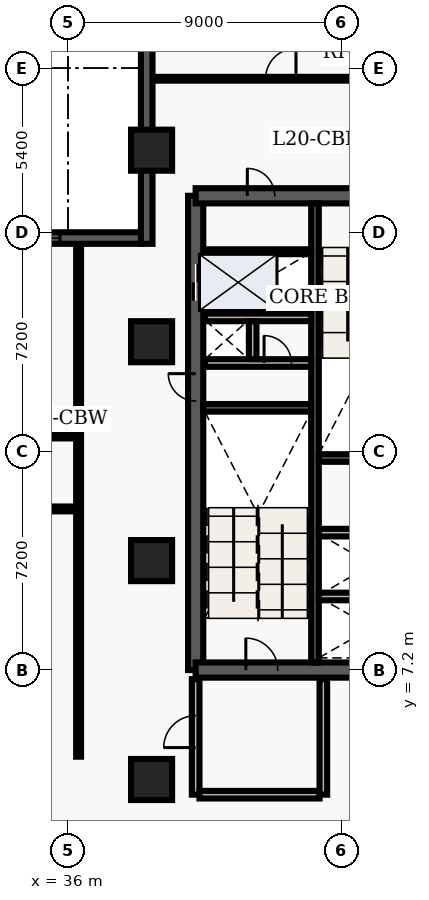
"""IFC4 building model, lengths in metres.
Left out: names, types, materials, properties, quantities, classifications, styles, units other than length and angle.
Written with IfcOpenShell. Run it as: python <this file> out.ifc"""

import sys

from ifc_helpers import new_model, entity, si_unit, converted_unit, direction, frame, origin_with_axes, origin_2d_with_axis, place, context, subcontext, project, spatial, polyline, rectangle, outline, extrude, element, fill, save


model = new_model("IFC4")
c1 = context("Model", 3, precision=1e-05, world=origin_with_axes(), true_north=direction((0.0, 1.0)))
c2 = subcontext(c1, "Body", "Model", "MODEL_VIEW")
j1 = project(units=[si_unit("LENGTHUNIT", "METRE"), converted_unit("PLANEANGLEUNIT", "DEGREE", entity("IfcPlaneAngleMeasure", 0.017), si_unit("PLANEANGLEUNIT", "RADIAN"), dimensions=[0, 0, 0, 0, 0, 0, 0])], contexts=[c1])
p1 = place(None, origin_with_axes())
s1 = spatial("IfcSite", under=j1, at=p1, CompositionType="ELEMENT")
p2 = place(p1, origin_with_axes())
s2 = spatial("IfcBuilding", under=s1, at=p2, CompositionType="ELEMENT")
p3 = place(p2, frame((0.0, 0.0, 84.6), z_axis=(0.0, 0.0, 1.0), x_axis=(1.0, 0.0, 0.0)))
s3 = spatial("IfcBuildingStorey", under=s2, at=p3, CompositionType="ELEMENT", Elevation=84.6)
p4 = place(p3, frame((40.2, 7.2, 0.0), z_axis=(0.0, 0.0, 1.0), x_axis=(0.0, 1.0, 0.0)))
e1 = element("IfcWall", 1, at=p4, inside=s3, PredefinedType="SHEAR", context=c2, shape_type="SweptSolid", body=[
    extrude(outline(polyline([(0.0, -0.25), (15.6, -0.25), (15.6, 0.25), (0.0, 0.25), (0.0, -0.25)])), origin_with_axes(), (0.0, 0.0, 1.0), 4.26),
])
p5 = place(p4, frame((12.75, 0.0, 0.0), z_axis=(0.0, 0.0, 1.0), x_axis=(1.0, 0.0, 0.0)))
e2 = element("IfcOpeningElement", 2, at=p5, cuts=e1, PredefinedType="OPENING", context=c2, shape_type="SweptSolid", body=[
    extrude(rectangle(XDim=1.2, YDim=0.52, at=origin_2d_with_axis()), origin_with_axes(), (0.0, 0.0, 1.0), 2.15),
])
p6 = place(p4, frame((9.3, 0.0, 0.0), z_axis=(0.0, 0.0, 1.0), x_axis=(1.0, 0.0, 0.0)))
e3 = element("IfcOpeningElement", 3, at=p6, cuts=e1, PredefinedType="OPENING", context=c2, shape_type="SweptSolid", body=[
    extrude(rectangle(XDim=0.9, YDim=0.52, at=origin_2d_with_axis()), origin_with_axes(), (0.0, 0.0, 1.0), 2.15),
])
p7 = place(p3, frame((40.2, 7.2, 0.0), z_axis=(0.0, 0.0, 1.0), x_axis=(1.0, 0.0, 0.0)))
e4 = element("IfcWall", 4, at=p7, inside=s3, PredefinedType="SHEAR", context=c2, shape_type="SweptSolid", body=[
    extrude(outline(polyline([(0.0, -0.25), (7.85, -0.25), (7.85, 0.25), (0.0, 0.25), (0.0, -0.25)])), origin_with_axes(), (0.0, 0.0, 1.0), 4.26),
])
p8 = place(p7, frame((2.175, 0.0, 0.0), z_axis=(0.0, 0.0, 1.0), x_axis=(1.0, 0.0, 0.0)))
e5 = element("IfcOpeningElement", 5, at=p8, cuts=e4, PredefinedType="OPENING", context=c2, shape_type="SweptSolid", body=[
    extrude(rectangle(XDim=1.05, YDim=0.52, at=origin_2d_with_axis()), origin_with_axes(), (0.0, 0.0, 1.0), 2.15),
])
p9 = place(p3, frame((40.2, 22.8, 0.0), z_axis=(0.0, 0.0, 1.0), x_axis=(1.0, 0.0, 0.0)))
e6 = element("IfcWall", 6, at=p9, inside=s3, PredefinedType="SHEAR", context=c2, shape_type="SweptSolid", body=[
    extrude(outline(polyline([(0.0, -0.25), (7.85, -0.25), (7.85, 0.25), (0.0, 0.25), (0.0, -0.25)])), origin_with_axes(), (0.0, 0.0, 1.0), 4.26),
])
p10 = place(p9, frame((5.775, 0.0, 0.0), z_axis=(0.0, 0.0, 1.0), x_axis=(1.0, 0.0, 0.0)))
e7 = element("IfcOpeningElement", 7, at=p10, cuts=e6, PredefinedType="OPENING", context=c2, shape_type="SweptSolid", body=[
    extrude(rectangle(XDim=1.05, YDim=0.52, at=origin_2d_with_axis()), origin_with_axes(), (0.0, 0.0, 1.0), 2.15),
])
p11 = place(p9, frame((2.15, 0.0, 0.0), z_axis=(0.0, 0.0, 1.0), x_axis=(1.0, 0.0, 0.0)))
e8 = element("IfcOpeningElement", 8, at=p11, cuts=e6, PredefinedType="OPENING", context=c2, shape_type="SweptSolid", body=[
    extrude(rectangle(XDim=0.9, YDim=0.52, at=origin_2d_with_axis()), origin_with_axes(), (0.0, 0.0, 1.0), 2.15),
])
p12 = place(p3, frame((44.125, 7.45, 0.0), z_axis=(0.0, 0.0, 1.0), x_axis=(0.0, 1.0, 0.0)))
e9 = element("IfcWall", 9, at=p12, inside=s3, PredefinedType="SHEAR", context=c2, shape_type="SweptSolid", body=[
    extrude(outline(polyline([(0.0, -0.125), (15.1, -0.125), (15.1, 0.125), (0.0, 0.125), (0.0, -0.125)])), origin_with_axes(), (0.0, 0.0, 1.0), 4.26),
])
for number, where, z_axis, x_axis in (
    (10, (40.45, 15.825, 0.0), (0.0, 0.0, 1.0), (1.0, 0.0, 0.0)),
    (11, (44.25, 14.175, 0.0), (0.0, 0.0, 1.0), (1.0, 0.0, 0.0)),
):
    element("IfcWall", number, at=place(p3, frame(where, z_axis=z_axis, x_axis=x_axis)), inside=s3, PredefinedType="SHEAR", context=c2, shape_type="SweptSolid", body=[
        extrude(outline(polyline([(0.0, -0.125), (3.55, -0.125), (3.55, 0.125), (0.0, 0.125), (0.0, -0.125)])), origin_with_axes(), (0.0, 0.0, 1.0), 4.26),
    ])
p13 = place(p3, frame((40.5, 17.3, 0.0), z_axis=(0.0, 0.0, 1.0), x_axis=(1.0, 0.0, 0.0)))
e12 = element("IfcWall", 12, at=p13, inside=s3, PredefinedType="SOLIDWALL", context=c2, shape_type="SweptSolid", body=[
    extrude(outline(polyline([(0.0, -0.125), (3.5, -0.125), (3.5, 0.125), (0.0, 0.125), (0.0, -0.125)])), origin_with_axes(), (0.0, 0.0, 1.0), 3.3),
])
p14 = place(p13, frame((2.4, 0.0, 0.0), z_axis=(0.0, 0.0, 1.0), x_axis=(1.0, 0.0, 0.0)))
e13 = element("IfcOpeningElement", 13, at=p14, cuts=e12, PredefinedType="OPENING", context=c2, shape_type="SweptSolid", body=[
    extrude(rectangle(XDim=0.9, YDim=0.27, at=origin_2d_with_axis()), origin_with_axes(), (0.0, 0.0, 1.0), 2.15),
])
p15 = place(p3, frame((40.5, 18.8, 0.0), z_axis=(0.0, 0.0, 1.0), x_axis=(1.0, 0.0, 0.0)))
e14 = element("IfcWall", 14, at=p15, inside=s3, PredefinedType="SOLIDWALL", context=c2, shape_type="SweptSolid", body=[
    extrude(outline(polyline([(0.0, -0.125), (3.5, -0.125), (3.5, 0.125), (0.0, 0.125), (0.0, -0.125)])), origin_with_axes(), (0.0, 0.0, 1.0), 3.3),
])
p16 = place(p3, frame((42.075, 17.43, 0.0), z_axis=(0.0, 0.0, 1.0), x_axis=(0.0, 1.0, 0.0)))
e15 = element("IfcWall", 15, at=p16, inside=s3, PredefinedType="SOLIDWALL", context=c2, shape_type="SweptSolid", body=[
    extrude(outline(polyline([(0.0, -0.125), (1.24, -0.125), (1.24, 0.125), (0.0, 0.125), (0.0, -0.125)])), origin_with_axes(), (0.0, 0.0, 1.0), 3.3),
])
p17 = place(p3, frame((40.2, 3.1, 0.0), z_axis=(0.0, 0.0, 1.0), x_axis=(0.0, 1.0, 0.0)))
e16 = element("IfcWall", 16, at=p17, inside=s3, PredefinedType="SOLIDWALL", context=c2, shape_type="SweptSolid", body=[
    extrude(outline(polyline([(0.0, -0.125), (3.8, -0.125), (3.8, 0.125), (0.0, 0.125), (0.0, -0.125)])), origin_with_axes(), (0.0, 0.0, 1.0), 3.3),
])
p18 = place(p17, frame((2.075, 0.0, 0.0), z_axis=(0.0, 0.0, 1.0), x_axis=(1.0, 0.0, 0.0)))
e17 = element("IfcOpeningElement", 17, at=p18, cuts=e16, PredefinedType="OPENING", context=c2, shape_type="SweptSolid", body=[
    extrude(rectangle(XDim=1.05, YDim=0.27, at=origin_2d_with_axis()), origin_with_axes(), (0.0, 0.0, 1.0), 2.15),
])
p19 = place(p3, frame((40.325, 3.1, 0.0), z_axis=(0.0, 0.0, 1.0), x_axis=(1.0, 0.0, 0.0)))
e18 = element("IfcWall", 18, at=p19, inside=s3, PredefinedType="SOLIDWALL", context=c2, shape_type="SweptSolid", body=[
    extrude(outline(polyline([(0.0, -0.125), (3.95, -0.125), (3.95, 0.125), (0.0, 0.125), (0.0, -0.125)])), origin_with_axes(), (0.0, 0.0, 1.0), 3.3),
])
p20 = place(p3, frame((44.4, 3.1, 0.0), z_axis=(0.0, 0.0, 1.0), x_axis=(0.0, 1.0, 0.0)))
e19 = element("IfcWall", 19, at=p20, inside=s3, PredefinedType="SOLIDWALL", context=c2, shape_type="SweptSolid", body=[
    extrude(outline(polyline([(0.0, -0.125), (3.8, -0.125), (3.8, 0.125), (0.0, 0.125), (0.0, -0.125)])), origin_with_axes(), (0.0, 0.0, 1.0), 3.3),
])
for number, where, z_axis, x_axis in (
    (20, (38.75, 3.6, 0.0), (0.0, 0.0, 1.0), (1.0, 0.0, 0.0)),
    (21, (38.75, 10.8, 0.0), (0.0, 0.0, 1.0), (1.0, 0.0, 0.0)),
    (22, (38.75, 18.0, 0.0), (0.0, 0.0, 1.0), (1.0, 0.0, 0.0)),
    (23, (38.75, 24.3, 0.0), (0.0, 0.0, 1.0), (1.0, 0.0, 0.0)),
):
    element("IfcColumn", number, at=place(p3, frame(where, z_axis=z_axis, x_axis=x_axis)), inside=s3, PredefinedType="COLUMN", context=c2, shape_type="SweptSolid", body=[
        extrude(rectangle(XDim=1.35, YDim=1.35, at=origin_2d_with_axis()), origin_with_axes(), (0.0, 0.0, 1.0), 4.5),
    ])
p21 = place(p3, frame((40.5, 20.96, 0.0), z_axis=(0.0, 0.0, 1.0), x_axis=(1.0, 0.0, 0.0)))
e24 = element("IfcWall", 24, at=p21, inside=s3, PredefinedType="PARTITIONING", context=c2, shape_type="SweptSolid", body=[
    extrude(outline(polyline([(0.0, -0.08), (3.5, -0.08), (3.5, 0.08), (0.0, 0.08), (0.0, -0.08)])), origin_with_axes(), (0.0, 0.0, 1.0), 3.2),
])
for number, where, z_axis, x_axis in (
    (25, (44.25, 9.62, 0.0), (0.0, 0.0, 1.0), (1.0, 0.0, 0.0)),
    (26, (44.25, 11.72, 0.0), (0.0, 0.0, 1.0), (1.0, 0.0, 0.0)),
):
    element("IfcWall", number, at=place(p3, frame(where, z_axis=z_axis, x_axis=x_axis)), inside=s3, PredefinedType="SOLIDWALL", context=c2, shape_type="SweptSolid", body=[
        extrude(outline(polyline([(0.0, -0.125), (3.5, -0.125), (3.5, 0.125), (0.0, 0.125), (0.0, -0.125)])), origin_with_axes(), (0.0, 0.0, 1.0), 3.2),
    ])
p22 = place(p3, frame((21.15, 12.5, 0.0), z_axis=(0.0, 0.0, 1.0), x_axis=(1.0, 0.0, 0.0)))
e27 = element("IfcWall", 27, at=p22, inside=s3, PredefinedType="PARTITIONING", context=c2, shape_type="SweptSolid", body=[
    extrude(outline(polyline([(0.0, -0.08), (15.2, -0.08), (15.2, 0.08), (0.0, 0.08), (0.0, -0.08)])), origin_with_axes(), (0.0, 0.0, 1.0), 3.2),
])
p23 = place(p22, frame((3.491, 0.0, 0.0), z_axis=(0.0, 0.0, 1.0), x_axis=(1.0, 0.0, 0.0)))
e28 = element("IfcOpeningElement", 28, at=p23, cuts=e27, PredefinedType="OPENING", context=c2, shape_type="SweptSolid", body=[
    extrude(rectangle(XDim=1.0, YDim=0.18, at=origin_2d_with_axis()), origin_with_axes(), (0.0, 0.0, 1.0), 2.15),
])
p24 = place(p22, frame((10.961, 0.0, 0.0), z_axis=(0.0, 0.0, 1.0), x_axis=(1.0, 0.0, 0.0)))
e29 = element("IfcOpeningElement", 29, at=p24, cuts=e27, PredefinedType="OPENING", context=c2, shape_type="SweptSolid", body=[
    extrude(rectangle(XDim=1.0, YDim=0.18, at=origin_2d_with_axis()), origin_with_axes(), (0.0, 0.0, 1.0), 2.15),
])
p25 = place(p3, frame((21.15, 14.9, 0.0), z_axis=(0.0, 0.0, 1.0), x_axis=(1.0, 0.0, 0.0)))
e30 = element("IfcWall", 30, at=p25, inside=s3, PredefinedType="PARTITIONING", context=c2, shape_type="SweptSolid", body=[
    extrude(outline(polyline([(0.0, -0.08), (15.2, -0.08), (15.2, 0.08), (0.0, 0.08), (0.0, -0.08)])), origin_with_axes(), (0.0, 0.0, 1.0), 3.2),
])
p26 = place(p25, frame((3.515, 0.0, 0.0), z_axis=(0.0, 0.0, 1.0), x_axis=(1.0, 0.0, 0.0)))
e31 = element("IfcOpeningElement", 31, at=p26, cuts=e30, PredefinedType="OPENING", context=c2, shape_type="SweptSolid", body=[
    extrude(rectangle(XDim=1.0, YDim=0.18, at=origin_2d_with_axis()), origin_with_axes(), (0.0, 0.0, 1.0), 2.15),
])
p27 = place(p25, frame((10.986, 0.0, 0.0), z_axis=(0.0, 0.0, 1.0), x_axis=(1.0, 0.0, 0.0)))
e32 = element("IfcOpeningElement", 32, at=p27, cuts=e30, PredefinedType="OPENING", context=c2, shape_type="SweptSolid", body=[
    extrude(rectangle(XDim=1.0, YDim=0.18, at=origin_2d_with_axis()), origin_with_axes(), (0.0, 0.0, 1.0), 2.15),
])
p28 = place(p3, frame((36.35, 4.35, 0.0), z_axis=(0.0, 0.0, 1.0), x_axis=(0.0, 1.0, 0.0)))
e33 = element("IfcWall", 33, at=p28, inside=s3, PredefinedType="PARTITIONING", context=c2, shape_type="SweptSolid", body=[
    extrude(outline(polyline([(0.0, -0.08), (16.95, -0.08), (16.95, 0.08), (0.0, 0.08), (0.0, -0.08)])), origin_with_axes(), (0.0, 0.0, 1.0), 3.2),
])
p29 = place(p3, frame((38.76, 26.65, 0.0), z_axis=(0.0, 0.0, 1.0), x_axis=(1.0, 0.0, 0.0)))
e34 = element("IfcWall", 34, at=p29, inside=s3, PredefinedType="PARTITIONING", context=c2, shape_type="SweptSolid", body=[
    extrude(outline(polyline([(0.0, -0.062), (20.88, -0.062), (20.88, 0.062), (0.0, 0.062), (0.0, -0.062)])), origin_with_axes(), (0.0, 0.0, 1.0), 3.2),
])
p30 = place(p29, frame((4.24, 0.0, 0.0), z_axis=(0.0, 0.0, 1.0), x_axis=(1.0, 0.0, 0.0)))
e35 = element("IfcOpeningElement", 35, at=p30, cuts=e34, PredefinedType="OPENING", context=c2, shape_type="SweptSolid", body=[
    extrude(rectangle(XDim=1.0, YDim=0.145, at=origin_2d_with_axis()), origin_with_axes(), (0.0, 0.0, 1.0), 2.15),
])
p31 = place(p3, frame((38.59, 21.22, 0.0), z_axis=(0.0, 0.0, 1.0), x_axis=(0.0, 1.0, 0.0)))
e36 = element("IfcWall", 36, at=p31, inside=s3, PredefinedType="SOLIDWALL", context=c2, shape_type="SweptSolid", body=[
    extrude(outline(polyline([(0.0, -0.19), (7.58, -0.19), (7.58, 0.19), (0.0, 0.19), (0.0, -0.19)])), origin_with_axes(), (0.0, 0.0, 1.0), 4.26),
])
p32 = place(p3, frame((21.22, 21.41, 0.0), z_axis=(0.0, 0.0, 1.0), x_axis=(1.0, 0.0, 0.0)))
e37 = element("IfcWall", 37, at=p32, inside=s3, PredefinedType="SOLIDWALL", context=c2, shape_type="SweptSolid", body=[
    extrude(outline(polyline([(0.0, -0.19), (17.18, -0.19), (17.18, 0.19), (0.0, 0.19), (0.0, -0.19)])), origin_with_axes(), (0.0, 0.0, 1.0), 4.26),
])
p33 = place(p32, frame((3.263, 0.0, 0.45), z_axis=(0.0, 0.0, 1.0), x_axis=(1.0, 0.0, 0.0)))
e38 = element("IfcOpeningElement", 38, at=p33, cuts=e37, PredefinedType="OPENING", context=c2, shape_type="SweptSolid", body=[
    extrude(rectangle(XDim=2.1, YDim=0.4, at=origin_2d_with_axis()), origin_with_axes(), (0.0, 0.0, 1.0), 2.2),
])
p34 = place(p32, frame((8.59, 0.0, 0.45), z_axis=(0.0, 0.0, 1.0), x_axis=(1.0, 0.0, 0.0)))
e39 = element("IfcOpeningElement", 39, at=p34, cuts=e37, PredefinedType="OPENING", context=c2, shape_type="SweptSolid", body=[
    extrude(rectangle(XDim=2.1, YDim=0.4, at=origin_2d_with_axis()), origin_with_axes(), (0.0, 0.0, 1.0), 2.2),
])
p35 = place(p32, frame((13.467, 0.0, 0.45), z_axis=(0.0, 0.0, 1.0), x_axis=(1.0, 0.0, 0.0)))
e40 = element("IfcOpeningElement", 40, at=p35, cuts=e37, PredefinedType="OPENING", context=c2, shape_type="SweptSolid", body=[
    extrude(rectangle(XDim=2.1, YDim=0.4, at=origin_2d_with_axis()), origin_with_axes(), (0.0, 0.0, 1.0), 2.2),
])
p36 = place(p4, frame((12.75, 0.0, 0.0), z_axis=(0.0, 0.0, 1.0), x_axis=(1.0, 0.0, 0.0)))
e41 = element("IfcDoor", 41, at=p36, inside=s3, OperationType="DOUBLE_DOOR_SLIDING", PredefinedType="DOOR", context=c2, shape_type="SweptSolid", body=[
    extrude(rectangle(XDim=1.2, YDim=0.09, at=origin_2d_with_axis()), origin_with_axes(), (0.0, 0.0, 1.0), 2.15),
])
fill(e2, e41)
p37 = place(p4, frame((9.3, 0.0, 0.0), z_axis=(0.0, 0.0, 1.0), x_axis=(1.0, 0.0, 0.0)))
e42 = element("IfcDoor", 42, at=p37, inside=s3, OperationType="SINGLE_SWING_RIGHT", PredefinedType="DOOR", context=c2, shape_type="SweptSolid", body=[
    extrude(rectangle(XDim=0.9, YDim=0.09, at=origin_2d_with_axis()), origin_with_axes(), (0.0, 0.0, 1.0), 2.15),
])
fill(e3, e42)
p38 = place(p13, frame((2.4, 0.0, 0.0), z_axis=(0.0, 0.0, 1.0), x_axis=(1.0, 0.0, 0.0)))
e43 = element("IfcDoor", 43, at=p38, inside=s3, OperationType="SINGLE_SWING_LEFT", PredefinedType="DOOR", context=c2, shape_type="SweptSolid", body=[
    extrude(rectangle(XDim=0.9, YDim=0.09, at=origin_2d_with_axis()), origin_with_axes(), (0.0, 0.0, 1.0), 2.15),
])
fill(e13, e43)
p39 = place(p7, frame((2.175, 0.0, 0.0), z_axis=(0.0, 0.0, 1.0), x_axis=(1.0, 0.0, 0.0)))
e44 = element("IfcDoor", 44, at=p39, inside=s3, OperationType="SINGLE_SWING_LEFT", PredefinedType="DOOR", context=c2, shape_type="SweptSolid", body=[
    extrude(rectangle(XDim=1.05, YDim=0.09, at=origin_2d_with_axis()), origin_with_axes(), (0.0, 0.0, 1.0), 2.15),
])
fill(e5, e44)
p40 = place(p17, frame((2.075, 0.0, 0.0), z_axis=(0.0, 0.0, 1.0), x_axis=(1.0, 0.0, 0.0)))
e45 = element("IfcDoor", 45, at=p40, inside=s3, OperationType="SINGLE_SWING_LEFT", PredefinedType="DOOR", context=c2, shape_type="SweptSolid", body=[
    extrude(rectangle(XDim=1.05, YDim=0.09, at=origin_2d_with_axis()), origin_with_axes(), (0.0, 0.0, 1.0), 2.15),
])
fill(e17, e45)
p41 = place(p9, frame((2.15, 0.0, 0.0), z_axis=(0.0, 0.0, 1.0), x_axis=(1.0, 0.0, 0.0)))
e46 = element("IfcDoor", 46, at=p41, inside=s3, OperationType="SINGLE_SWING_LEFT", PredefinedType="DOOR", context=c2, shape_type="SweptSolid", body=[
    extrude(rectangle(XDim=0.9, YDim=0.09, at=origin_2d_with_axis()), origin_with_axes(), (0.0, 0.0, 1.0), 2.15),
])
fill(e8, e46)
p42 = place(p29, frame((4.24, 0.0, 0.0), z_axis=(0.0, 0.0, 1.0), x_axis=(1.0, 0.0, 0.0)))
e47 = element("IfcDoor", 47, at=p42, inside=s3, OperationType="SINGLE_SWING_RIGHT", PredefinedType="DOOR", context=c2, shape_type="SweptSolid", body=[
    extrude(rectangle(XDim=1.0, YDim=0.075, at=origin_2d_with_axis()), origin_with_axes(), (0.0, 0.0, 1.0), 2.15),
])
fill(e35, e47)
p43 = place(p32, frame((13.467, 0.0, 0.45), z_axis=(0.0, 0.0, 1.0), x_axis=(1.0, 0.0, 0.0)))
e48 = element("IfcWindow", 48, at=p43, inside=s3, PredefinedType="WINDOW", context=c2, shape_type="SweptSolid", body=[
    extrude(rectangle(XDim=2.1, YDim=0.09, at=origin_2d_with_axis()), origin_with_axes(), (0.0, 0.0, 1.0), 2.2),
])
fill(e40, e48)
save(model, sys.argv[1])
